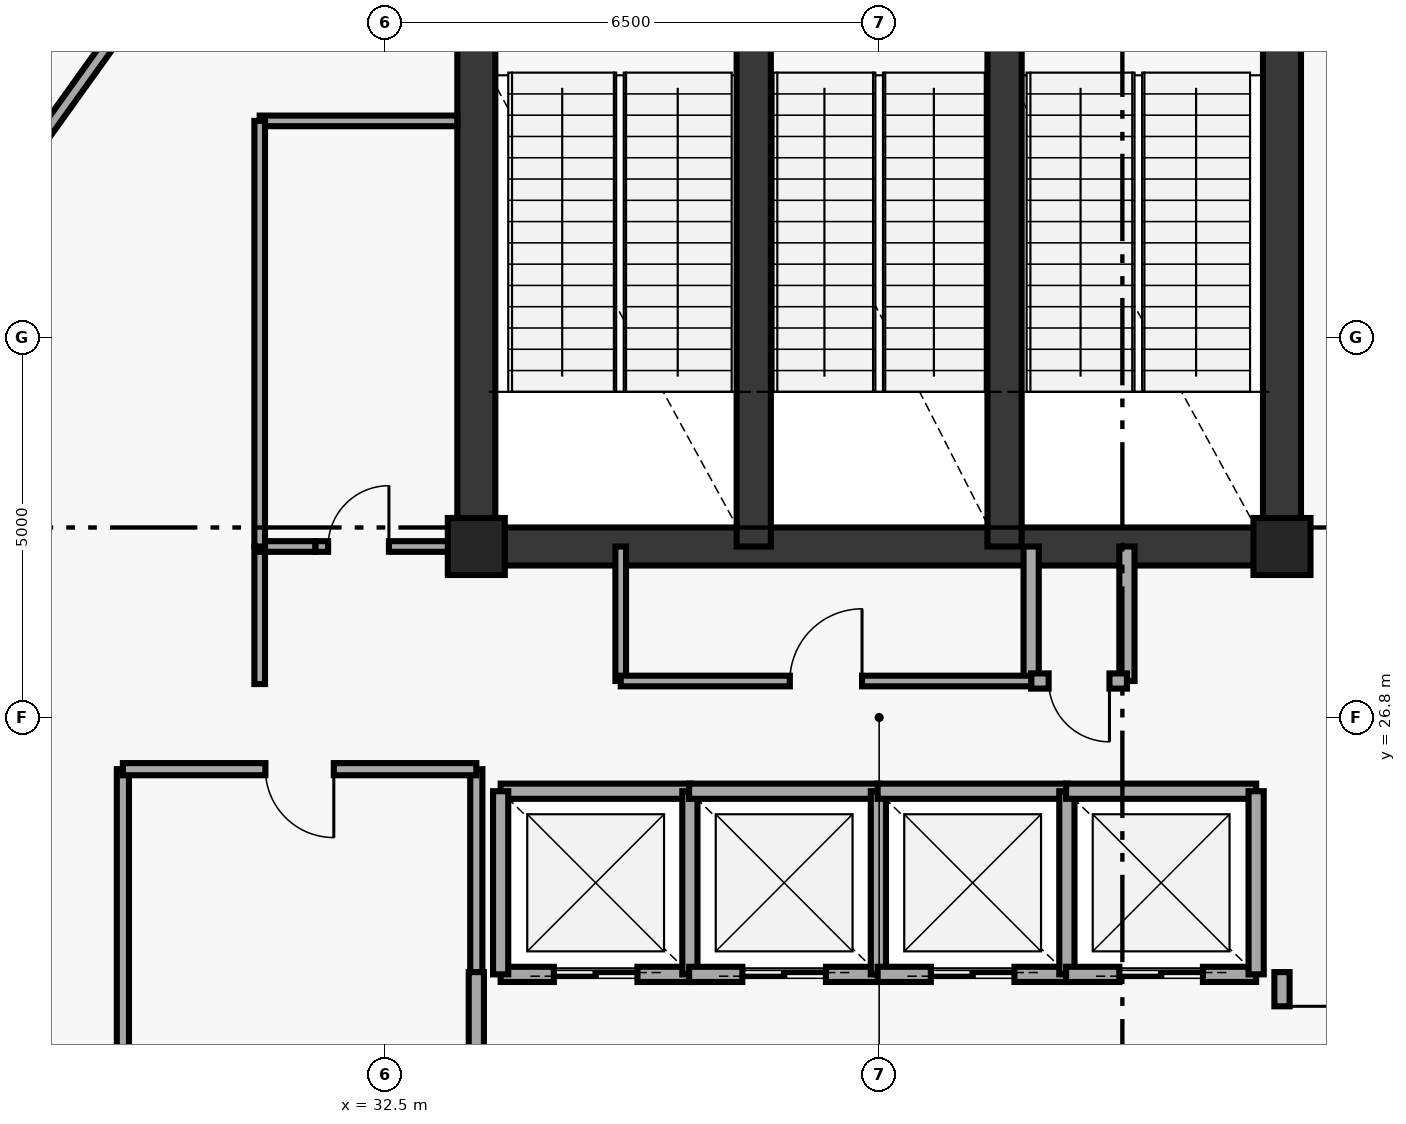
"""IFC4 building model, lengths in metres.
Left out: names, types, materials, properties, quantities, classifications, styles, units other than length and angle.
Written with IfcOpenShell. Run it as: python <this file> out.ifc"""

import sys

from ifc_helpers import new_model, si_unit, direction, frame, frame_2d, origin, origin_2d, place, context, subcontext, project, spatial, rectangle, extrude, element, fill, save


model = new_model("IFC4")
c1 = context("Model", 3, precision=1e-05, world=origin(), true_north=direction((0.0, 1.0)))
c2 = subcontext(c1, "Body", "Model", "MODEL_VIEW")
j1 = project(units=[si_unit("LENGTHUNIT", "METRE"), si_unit("PLANEANGLEUNIT", "RADIAN")], contexts=[c1])
p1 = place(None, origin())
s1 = spatial("IfcSite", under=j1, at=p1, CompositionType="ELEMENT")
p2 = place(p1, origin())
s2 = spatial("IfcBuilding", under=s1, at=p2, CompositionType="ELEMENT")
p3 = place(p2, frame((0.0, 0.0, 301.2)))
s3 = spatial("IfcBuildingStorey", under=s2, at=p3, CompositionType="ELEMENT", Elevation=301.2)
for number, where, z_axis, x_axis in (
    (1, (44.3, 29.05, 0.0), (0.0, 0.0, 1.0), (1.0, 0.0, 0.0)),
    (2, (33.7, 29.05, 0.0), (0.0, 0.0, 1.0), (1.0, 0.0, 0.0)),
):
    element("IfcColumn", number, at=place(p3, frame(where, z_axis=z_axis, x_axis=x_axis)), inside=s3, PredefinedType="PILASTER", context=c2, shape_type="SweptSolid", body=[
        extrude(rectangle(XDim=0.75, YDim=0.75, at=origin_2d()), origin(), (0.0, 0.0, 1.0), 5.25),
    ])
for number, where, z_axis, x_axis in (
    (3, (33.7, 29.05, 0.0), (0.0, 0.0, 1.0), (0.0, 1.0, 0.0)),
    (4, (44.3, 29.05, 0.0), (0.0, 0.0, 1.0), (0.0, 1.0, 0.0)),
):
    element("IfcWall", number, at=place(p3, frame(where, z_axis=z_axis, x_axis=x_axis)), inside=s3, PredefinedType="SHEAR", context=c2, shape_type="SweptSolid", body=[
        extrude(rectangle(XDim=8.35, YDim=0.5, at=frame_2d((4.175, 0.0))), origin(), (0.0, 0.0, 1.0), 5.25),
    ])
p4 = place(p3, frame((33.7, 29.05, 0.0), z_axis=(0.0, 0.0, 1.0), x_axis=(1.0, 0.0, 0.0)))
e5 = element("IfcWall", 5, at=p4, inside=s3, PredefinedType="SHEAR", context=c2, shape_type="SweptSolid", body=[
    extrude(rectangle(XDim=10.6, YDim=0.5, at=frame_2d((5.3, 0.0))), origin(), (0.0, 0.0, 1.0), 5.25),
])
for number, where, z_axis, x_axis in (
    (6, (37.35, 29.05, 0.0), (0.0, 0.0, 1.0), (0.0, 1.0, 0.0)),
    (7, (40.65, 29.05, 0.0), (0.0, 0.0, 1.0), (0.0, 1.0, 0.0)),
):
    element("IfcWall", number, at=place(p3, frame(where, z_axis=z_axis, x_axis=x_axis)), inside=s3, PredefinedType="SHEAR", context=c2, shape_type="SweptSolid", body=[
        extrude(rectangle(XDim=8.35, YDim=0.45, at=frame_2d((4.175, 0.0))), origin(), (0.0, 0.0, 1.0), 5.25),
    ])
p5 = place(p3, frame((35.6, 27.28, 0.0), z_axis=(0.0, 0.0, 1.0), x_axis=(0.0, 1.0, 0.0)))
e8 = element("IfcWall", 8, at=p5, inside=s3, PredefinedType="PARTITIONING", context=c2, shape_type="SweptSolid", body=[
    extrude(rectangle(XDim=1.77, YDim=0.14, at=frame_2d((0.885, 0.0))), origin(), (0.0, 0.0, 1.0), 5.25),
])
for number, where, z_axis, x_axis in (
    (9, (41.0, 27.28, 0.0), (0.0, 0.0, 1.0), (0.0, 1.0, 0.0)),
    (10, (42.26, 27.28, 0.0), (0.0, 0.0, 1.0), (0.0, 1.0, 0.0)),
):
    element("IfcWall", number, at=place(p3, frame(where, z_axis=z_axis, x_axis=x_axis)), inside=s3, PredefinedType="SOLIDWALL", context=c2, shape_type="SweptSolid", body=[
        extrude(rectangle(XDim=1.77, YDim=0.2, at=frame_2d((0.885, 0.0))), origin(), (0.0, 0.0, 1.0), 5.25),
    ])
p6 = place(p3, frame((41.0, 27.28, 0.0), z_axis=(0.0, 0.0, 1.0), x_axis=(1.0, 0.0, 0.0)))
e11 = element("IfcWall", 11, at=p6, inside=s3, PredefinedType="SOLIDWALL", context=c2, shape_type="SweptSolid", body=[
    extrude(rectangle(XDim=1.26, YDim=0.2, at=frame_2d((0.63, 0.0))), origin(), (0.0, 0.0, 1.0), 5.25),
])
p7 = place(p6, frame((0.23, 0.0, 0.0)))
e12 = element("IfcOpeningElement", 12, at=p7, cuts=e11, PredefinedType="OPENING", context=c2, shape_type="SweptSolid", body=[
    extrude(rectangle(XDim=0.8, YDim=2.05, at=frame_2d((0.4, 1.025))), frame((0.0, 0.11, 0.0), z_axis=(0.0, -1.0, 0.0), x_axis=(1.0, 0.0, 0.0)), (0.0, 0.0, 1.0), 0.22),
])
p8 = place(p3, frame((34.02, 23.42, 0.0), z_axis=(0.0, 0.0, 1.0), x_axis=(1.0, 0.0, 0.0)))
e13 = element("IfcWall", 13, at=p8, inside=s3, PredefinedType="SOLIDWALL", context=c2, shape_type="SweptSolid", body=[
    extrude(rectangle(XDim=2.5, YDim=0.2, at=frame_2d((1.25, 0.0))), origin(), (0.0, 0.0, 1.0), 5.25),
])
p9 = place(p8, frame((0.7, 0.0, 0.0)))
e14 = element("IfcOpeningElement", 14, at=p9, cuts=e13, PredefinedType="OPENING", context=c2, shape_type="SweptSolid", body=[
    extrude(rectangle(XDim=1.1, YDim=2.15, at=frame_2d((0.55, 1.075))), frame((0.0, 0.11, 0.0), z_axis=(0.0, -1.0, 0.0), x_axis=(1.0, 0.0, 0.0)), (0.0, 0.0, 1.0), 0.22),
])
p10 = place(p3, frame((34.02, 25.83, 0.0), z_axis=(0.0, 0.0, 1.0), x_axis=(1.0, 0.0, 0.0)))
e15 = element("IfcWall", 15, at=p10, inside=s3, PredefinedType="SOLIDWALL", context=c2, shape_type="SweptSolid", body=[
    extrude(rectangle(XDim=2.5, YDim=0.2, at=frame_2d((1.25, 0.0))), origin(), (0.0, 0.0, 1.0), 5.25),
])
for number, where, z_axis, x_axis in (
    (16, (34.02, 23.42, 0.0), (0.0, 0.0, 1.0), (0.0, 1.0, 0.0)),
    (17, (36.51, 23.42, 0.0), (0.0, 0.0, 1.0), (0.0, 1.0, 0.0)),
):
    element("IfcWall", number, at=place(p3, frame(where, z_axis=z_axis, x_axis=x_axis)), inside=s3, PredefinedType="SOLIDWALL", context=c2, shape_type="SweptSolid", body=[
        extrude(rectangle(XDim=2.41, YDim=0.2, at=frame_2d((1.205, 0.0))), origin(), (0.0, 0.0, 1.0), 5.25),
    ])
p11 = place(p3, frame((36.5, 23.42, 0.0), z_axis=(0.0, 0.0, 1.0), x_axis=(1.0, 0.0, 0.0)))
e18 = element("IfcWall", 18, at=p11, inside=s3, PredefinedType="SOLIDWALL", context=c2, shape_type="SweptSolid", body=[
    extrude(rectangle(XDim=2.5, YDim=0.2, at=frame_2d((1.25, 0.0))), origin(), (0.0, 0.0, 1.0), 5.25),
])
p12 = place(p11, frame((0.7, 0.0, 0.0)))
e19 = element("IfcOpeningElement", 19, at=p12, cuts=e18, PredefinedType="OPENING", context=c2, shape_type="SweptSolid", body=[
    extrude(rectangle(XDim=1.1, YDim=2.15, at=frame_2d((0.55, 1.075))), frame((0.0, 0.11, 0.0), z_axis=(0.0, -1.0, 0.0), x_axis=(1.0, 0.0, 0.0)), (0.0, 0.0, 1.0), 0.22),
])
p13 = place(p3, frame((36.5, 25.83, 0.0), z_axis=(0.0, 0.0, 1.0), x_axis=(1.0, 0.0, 0.0)))
e20 = element("IfcWall", 20, at=p13, inside=s3, PredefinedType="SOLIDWALL", context=c2, shape_type="SweptSolid", body=[
    extrude(rectangle(XDim=2.5, YDim=0.2, at=frame_2d((1.25, 0.0))), origin(), (0.0, 0.0, 1.0), 5.25),
])
p14 = place(p3, frame((38.99, 23.42, 0.0), z_axis=(0.0, 0.0, 1.0), x_axis=(0.0, 1.0, 0.0)))
e21 = element("IfcWall", 21, at=p14, inside=s3, PredefinedType="SOLIDWALL", context=c2, shape_type="SweptSolid", body=[
    extrude(rectangle(XDim=2.41, YDim=0.2, at=frame_2d((1.205, 0.0))), origin(), (0.0, 0.0, 1.0), 5.25),
])
p15 = place(p3, frame((38.98, 23.42, 0.0), z_axis=(0.0, 0.0, 1.0), x_axis=(1.0, 0.0, 0.0)))
e22 = element("IfcWall", 22, at=p15, inside=s3, PredefinedType="SOLIDWALL", context=c2, shape_type="SweptSolid", body=[
    extrude(rectangle(XDim=2.5, YDim=0.2, at=frame_2d((1.25, 0.0))), origin(), (0.0, 0.0, 1.0), 5.25),
])
p16 = place(p15, frame((0.7, 0.0, 0.0)))
e23 = element("IfcOpeningElement", 23, at=p16, cuts=e22, PredefinedType="OPENING", context=c2, shape_type="SweptSolid", body=[
    extrude(rectangle(XDim=1.1, YDim=2.15, at=frame_2d((0.55, 1.075))), frame((0.0, 0.11, 0.0), z_axis=(0.0, -1.0, 0.0), x_axis=(1.0, 0.0, 0.0)), (0.0, 0.0, 1.0), 0.22),
])
p17 = place(p3, frame((38.98, 25.83, 0.0), z_axis=(0.0, 0.0, 1.0), x_axis=(1.0, 0.0, 0.0)))
e24 = element("IfcWall", 24, at=p17, inside=s3, PredefinedType="SOLIDWALL", context=c2, shape_type="SweptSolid", body=[
    extrude(rectangle(XDim=2.5, YDim=0.2, at=frame_2d((1.25, 0.0))), origin(), (0.0, 0.0, 1.0), 5.25),
])
p18 = place(p3, frame((41.47, 23.42, 0.0), z_axis=(0.0, 0.0, 1.0), x_axis=(0.0, 1.0, 0.0)))
e25 = element("IfcWall", 25, at=p18, inside=s3, PredefinedType="SOLIDWALL", context=c2, shape_type="SweptSolid", body=[
    extrude(rectangle(XDim=2.41, YDim=0.2, at=frame_2d((1.205, 0.0))), origin(), (0.0, 0.0, 1.0), 5.25),
])
p19 = place(p3, frame((41.46, 23.42, 0.0), z_axis=(0.0, 0.0, 1.0), x_axis=(1.0, 0.0, 0.0)))
e26 = element("IfcWall", 26, at=p19, inside=s3, PredefinedType="SOLIDWALL", context=c2, shape_type="SweptSolid", body=[
    extrude(rectangle(XDim=2.5, YDim=0.2, at=frame_2d((1.25, 0.0))), origin(), (0.0, 0.0, 1.0), 5.25),
])
p20 = place(p19, frame((0.7, 0.0, 0.0)))
e27 = element("IfcOpeningElement", 27, at=p20, cuts=e26, PredefinedType="OPENING", context=c2, shape_type="SweptSolid", body=[
    extrude(rectangle(XDim=1.1, YDim=2.15, at=frame_2d((0.55, 1.075))), frame((0.0, 0.11, 0.0), z_axis=(0.0, -1.0, 0.0), x_axis=(1.0, 0.0, 0.0)), (0.0, 0.0, 1.0), 0.22),
])
p21 = place(p3, frame((41.46, 25.83, 0.0), z_axis=(0.0, 0.0, 1.0), x_axis=(1.0, 0.0, 0.0)))
e28 = element("IfcWall", 28, at=p21, inside=s3, PredefinedType="SOLIDWALL", context=c2, shape_type="SweptSolid", body=[
    extrude(rectangle(XDim=2.5, YDim=0.2, at=frame_2d((1.25, 0.0))), origin(), (0.0, 0.0, 1.0), 5.25),
])
p22 = place(p3, frame((43.96, 23.42, 0.0), z_axis=(0.0, 0.0, 1.0), x_axis=(0.0, 1.0, 0.0)))
e29 = element("IfcWall", 29, at=p22, inside=s3, PredefinedType="SOLIDWALL", context=c2, shape_type="SweptSolid", body=[
    extrude(rectangle(XDim=2.41, YDim=0.2, at=frame_2d((1.205, 0.0))), origin(), (0.0, 0.0, 1.0), 5.25),
])
p23 = place(p3, frame((29.05, 19.05, 0.0), z_axis=(0.0, 0.0, 1.0), x_axis=(0.0, 1.0, 0.0)))
e30 = element("IfcWall", 30, at=p23, inside=s3, PredefinedType="PARTITIONING", context=c2, shape_type="SweptSolid", body=[
    extrude(rectangle(XDim=7.07, YDim=0.16, at=frame_2d((3.535, 0.0))), origin(), (0.0, 0.0, 1.0), 5.25),
])
p24 = place(p3, frame((33.7, 23.45, 0.0), z_axis=(0.0, 0.0, 1.0), x_axis=(0.0, 1.0, 0.0)))
e31 = element("IfcWall", 31, at=p24, inside=s3, PredefinedType="PARTITIONING", context=c2, shape_type="SweptSolid", body=[
    extrude(rectangle(XDim=2.67, YDim=0.16, at=frame_2d((1.335, 0.0))), origin(), (0.0, 0.0, 1.0), 4.635),
])
p25 = place(p3, frame((33.7, 26.12, 0.0), z_axis=(0.0, 0.0, 1.0), x_axis=(-1.0, 0.0, 0.0)))
e32 = element("IfcWall", 32, at=p25, inside=s3, PredefinedType="PARTITIONING", context=c2, shape_type="SweptSolid", body=[
    extrude(rectangle(XDim=4.65, YDim=0.16, at=frame_2d((2.325, 0.0))), origin(), (0.0, 0.0, 1.0), 5.25),
])
p26 = place(p25, frame((1.875, 0.0, 0.0)))
e33 = element("IfcOpeningElement", 33, at=p26, cuts=e32, PredefinedType="OPENING", context=c2, shape_type="SweptSolid", body=[
    extrude(rectangle(XDim=0.9, YDim=2.1, at=frame_2d((0.45, 1.05))), frame((0.0, 0.09, 0.0), z_axis=(0.0, -1.0, 0.0), x_axis=(1.0, 0.0, 0.0)), (0.0, 0.0, 1.0), 0.18),
])
p27 = place(p3, frame((33.7, 21.3, 0.0), z_axis=(0.0, 0.0, 1.0), x_axis=(0.0, 1.0, 0.0)))
e34 = element("IfcWall", 34, at=p27, inside=s3, PredefinedType="SOLIDWALL", context=c2, shape_type="SweptSolid", body=[
    extrude(rectangle(XDim=2.15, YDim=0.2, at=frame_2d((1.075, 0.0))), origin(), (0.0, 0.0, 1.0), 4.635),
])
p28 = place(p3, frame((44.3, 21.35, 0.0), z_axis=(0.0, 0.0, 1.0), x_axis=(0.0, 1.0, 0.0)))
e35 = element("IfcWall", 35, at=p28, inside=s3, PredefinedType="SOLIDWALL", context=c2, shape_type="SweptSolid", body=[
    extrude(rectangle(XDim=2.1, YDim=0.2, at=frame_2d((1.05, 0.0))), origin(), (0.0, 0.0, 1.0), 4.635),
])
p29 = place(p28, frame((0.55, 0.0, 0.0)))
e36 = element("IfcOpeningElement", 36, at=p29, cuts=e35, PredefinedType="OPENING", context=c2, shape_type="SweptSolid", body=[
    extrude(rectangle(XDim=1.1, YDim=2.15, at=frame_2d((0.55, 1.075))), frame((0.0, 0.11, 0.0), z_axis=(0.0, -1.0, 0.0), x_axis=(1.0, 0.0, 0.0)), (0.0, 0.0, 1.0), 0.22),
])
p30 = place(p3, frame((35.6, 27.28, 0.0), z_axis=(0.0, 0.0, 1.0), x_axis=(1.0, 0.0, 0.0)))
e37 = element("IfcWall", 37, at=p30, inside=s3, PredefinedType="PARTITIONING", context=c2, shape_type="SweptSolid", body=[
    extrude(rectangle(XDim=5.4, YDim=0.14, at=frame_2d((2.7, 0.0))), origin(), (0.0, 0.0, 1.0), 5.25),
])
p31 = place(p30, frame((2.225, 0.0, 0.0)))
e38 = element("IfcOpeningElement", 38, at=p31, cuts=e37, PredefinedType="OPENING", context=c2, shape_type="SweptSolid", body=[
    extrude(rectangle(XDim=0.95, YDim=2.1, at=frame_2d((0.475, 1.05))), frame((0.0, 0.08, 0.0), z_axis=(0.0, -1.0, 0.0), x_axis=(1.0, 0.0, 0.0)), (0.0, 0.0, 1.0), 0.16),
])
p32 = place(p3, frame((30.85, 27.24, 0.0), z_axis=(0.0, 0.0, 1.0), x_axis=(0.0, 1.0, 0.0)))
e39 = element("IfcWall", 39, at=p32, inside=s3, PredefinedType="PARTITIONING", context=c2, shape_type="SweptSolid", body=[
    extrude(rectangle(XDim=1.81, YDim=0.14, at=frame_2d((0.905, 0.0))), origin(), (0.0, 0.0, 1.0), 5.25),
])
p33 = place(p3, frame((30.85, 29.05, 0.0), z_axis=(0.0, 0.0, 1.0), x_axis=(1.0, 0.0, 0.0)))
e40 = element("IfcWall", 40, at=p33, inside=s3, PredefinedType="PARTITIONING", context=c2, shape_type="SweptSolid", body=[
    extrude(rectangle(XDim=0.734, YDim=0.14, at=frame_2d((0.367, 0.0))), origin(), (0.0, 0.0, 1.0), 5.25),
])
p34 = place(p3, frame((31.584, 29.05, 0.0), z_axis=(0.0, 0.0, 1.0), x_axis=(1.0, 0.0, 0.0)))
e41 = element("IfcWall", 41, at=p34, inside=s3, PredefinedType="PARTITIONING", context=c2, shape_type="SweptSolid", body=[
    extrude(rectangle(XDim=1.866, YDim=0.14, at=frame_2d((0.933, 0.0))), origin(), (0.0, 0.0, 1.0), 3.45),
])
p35 = place(p34, frame((0.166, 0.0, 0.0)))
e42 = element("IfcOpeningElement", 42, at=p35, cuts=e41, PredefinedType="OPENING", context=c2, shape_type="SweptSolid", body=[
    extrude(rectangle(XDim=0.8, YDim=2.05, at=frame_2d((0.4, 1.025))), frame((0.0, 0.08, 0.0), z_axis=(0.0, -1.0, 0.0), x_axis=(1.0, 0.0, 0.0)), (0.0, 0.0, 1.0), 0.16),
])
p36 = place(p3, frame((30.85, 34.65, 0.0), z_axis=(0.0, 0.0, 1.0), x_axis=(1.0, 0.0, 0.0)))
e43 = element("IfcWall", 43, at=p36, inside=s3, PredefinedType="PARTITIONING", context=c2, shape_type="SweptSolid", body=[
    extrude(rectangle(XDim=2.6, YDim=0.14, at=frame_2d((1.3, 0.0))), origin(), (0.0, 0.0, 1.0), 5.25),
])
p37 = place(p3, frame((30.85, 29.05, 0.0), z_axis=(0.0, 0.0, 1.0), x_axis=(0.0, 1.0, 0.0)))
e44 = element("IfcWall", 44, at=p37, inside=s3, PredefinedType="PARTITIONING", context=c2, shape_type="SweptSolid", body=[
    extrude(rectangle(XDim=5.6, YDim=0.14, at=frame_2d((2.8, 0.0))), origin(), (0.0, 0.0, 1.0), 5.25),
])
p38 = place(p3, frame((32.281, 40.436, 0.0), z_axis=(0.0, 0.0, 1.0), x_axis=(-0.581884927471, -0.813271130179, 0.0)))
e45 = element("IfcWall", 45, at=p38, inside=s3, PredefinedType="PARTITIONING", context=c2, shape_type="SweptSolid", body=[
    extrude(rectangle(XDim=7.532, YDim=0.16, at=frame_2d((3.766, 0.0))), origin(), (0.0, 0.0, 1.0), 5.25),
])
p39 = place(p3, frame((25.663, 22.614, 0.0), z_axis=(0.0, 0.0, 1.0), x_axis=(0.449672541353, -0.893193487187, 0.0)))
e46 = element("IfcWall", 46, at=p39, inside=s3, PredefinedType="PARTITIONING", context=c2, shape_type="SweptSolid", body=[
    extrude(rectangle(XDim=8.057, YDim=0.16, at=frame_2d((4.028, 0.0))), origin(), (0.0, 0.0, 1.0), 5.25),
])
p40 = place(p7, origin())
e47 = element("IfcDoor", 47, at=p40, inside=s3, OperationType="SINGLE_SWING_RIGHT", PredefinedType="DOOR", context=c2, shape_type="SweptSolid", body=[
    extrude(rectangle(XDim=0.8, YDim=2.05, at=frame_2d((0.4, 1.025))), frame((0.0, 0.025, 0.0), z_axis=(0.0, -1.0, 0.0), x_axis=(1.0, 0.0, 0.0)), (0.0, 0.0, 1.0), 0.05),
])
fill(e12, e47)
p41 = place(p9, origin())
e48 = element("IfcDoor", 48, at=p41, inside=s3, OperationType="DOUBLE_DOOR_SLIDING", PredefinedType="DOOR", context=c2, shape_type="SweptSolid", body=[
    extrude(rectangle(XDim=1.1, YDim=2.15, at=frame_2d((0.55, 1.075))), frame((0.0, 0.025, 0.0), z_axis=(0.0, -1.0, 0.0), x_axis=(1.0, 0.0, 0.0)), (0.0, 0.0, 1.0), 0.05),
])
fill(e14, e48)
p42 = place(p12, origin())
e49 = element("IfcDoor", 49, at=p42, inside=s3, OperationType="DOUBLE_DOOR_SLIDING", PredefinedType="DOOR", context=c2, shape_type="SweptSolid", body=[
    extrude(rectangle(XDim=1.1, YDim=2.15, at=frame_2d((0.55, 1.075))), frame((0.0, 0.025, 0.0), z_axis=(0.0, -1.0, 0.0), x_axis=(1.0, 0.0, 0.0)), (0.0, 0.0, 1.0), 0.05),
])
fill(e19, e49)
p43 = place(p16, origin())
e50 = element("IfcDoor", 50, at=p43, inside=s3, OperationType="DOUBLE_DOOR_SLIDING", PredefinedType="DOOR", context=c2, shape_type="SweptSolid", body=[
    extrude(rectangle(XDim=1.1, YDim=2.15, at=frame_2d((0.55, 1.075))), frame((0.0, 0.025, 0.0), z_axis=(0.0, -1.0, 0.0), x_axis=(1.0, 0.0, 0.0)), (0.0, 0.0, 1.0), 0.05),
])
fill(e23, e50)
p44 = place(p20, origin())
e51 = element("IfcDoor", 51, at=p44, inside=s3, OperationType="DOUBLE_DOOR_SLIDING", PredefinedType="DOOR", context=c2, shape_type="SweptSolid", body=[
    extrude(rectangle(XDim=1.1, YDim=2.15, at=frame_2d((0.55, 1.075))), frame((0.0, 0.025, 0.0), z_axis=(0.0, -1.0, 0.0), x_axis=(1.0, 0.0, 0.0)), (0.0, 0.0, 1.0), 0.05),
])
fill(e27, e51)
p45 = place(p26, origin())
e52 = element("IfcDoor", 52, at=p45, inside=s3, OperationType="SINGLE_SWING_LEFT", PredefinedType="DOOR", context=c2, shape_type="SweptSolid", body=[
    extrude(rectangle(XDim=0.9, YDim=2.1, at=frame_2d((0.45, 1.05))), frame((0.0, 0.025, 0.0), z_axis=(0.0, -1.0, 0.0), x_axis=(1.0, 0.0, 0.0)), (0.0, 0.0, 1.0), 0.05),
])
fill(e33, e52)
p46 = place(p29, origin())
e53 = element("IfcDoor", 53, at=p46, inside=s3, OperationType="SINGLE_SWING_RIGHT", PredefinedType="DOOR", context=c2, shape_type="SweptSolid", body=[
    extrude(rectangle(XDim=1.1, YDim=2.15, at=frame_2d((0.55, 1.075))), frame((0.0, 0.025, 0.0), z_axis=(0.0, -1.0, 0.0), x_axis=(1.0, 0.0, 0.0)), (0.0, 0.0, 1.0), 0.05),
])
fill(e36, e53)
p47 = place(p31, origin())
e54 = element("IfcDoor", 54, at=p47, inside=s3, OperationType="SINGLE_SWING_RIGHT", PredefinedType="DOOR", context=c2, shape_type="SweptSolid", body=[
    extrude(rectangle(XDim=0.95, YDim=2.1, at=frame_2d((0.475, 1.05))), frame((0.0, 0.025, 0.0), z_axis=(0.0, -1.0, 0.0), x_axis=(1.0, 0.0, 0.0)), (0.0, 0.0, 1.0), 0.05),
])
fill(e38, e54)
p48 = place(p35, origin())
e55 = element("IfcDoor", 55, at=p48, inside=s3, OperationType="SINGLE_SWING_RIGHT", PredefinedType="DOOR", context=c2, shape_type="SweptSolid", body=[
    extrude(rectangle(XDim=0.8, YDim=2.05, at=frame_2d((0.4, 1.025))), frame((0.0, 0.025, 0.0), z_axis=(0.0, -1.0, 0.0), x_axis=(1.0, 0.0, 0.0)), (0.0, 0.0, 1.0), 0.05),
])
fill(e42, e55)
save(model, sys.argv[1])
